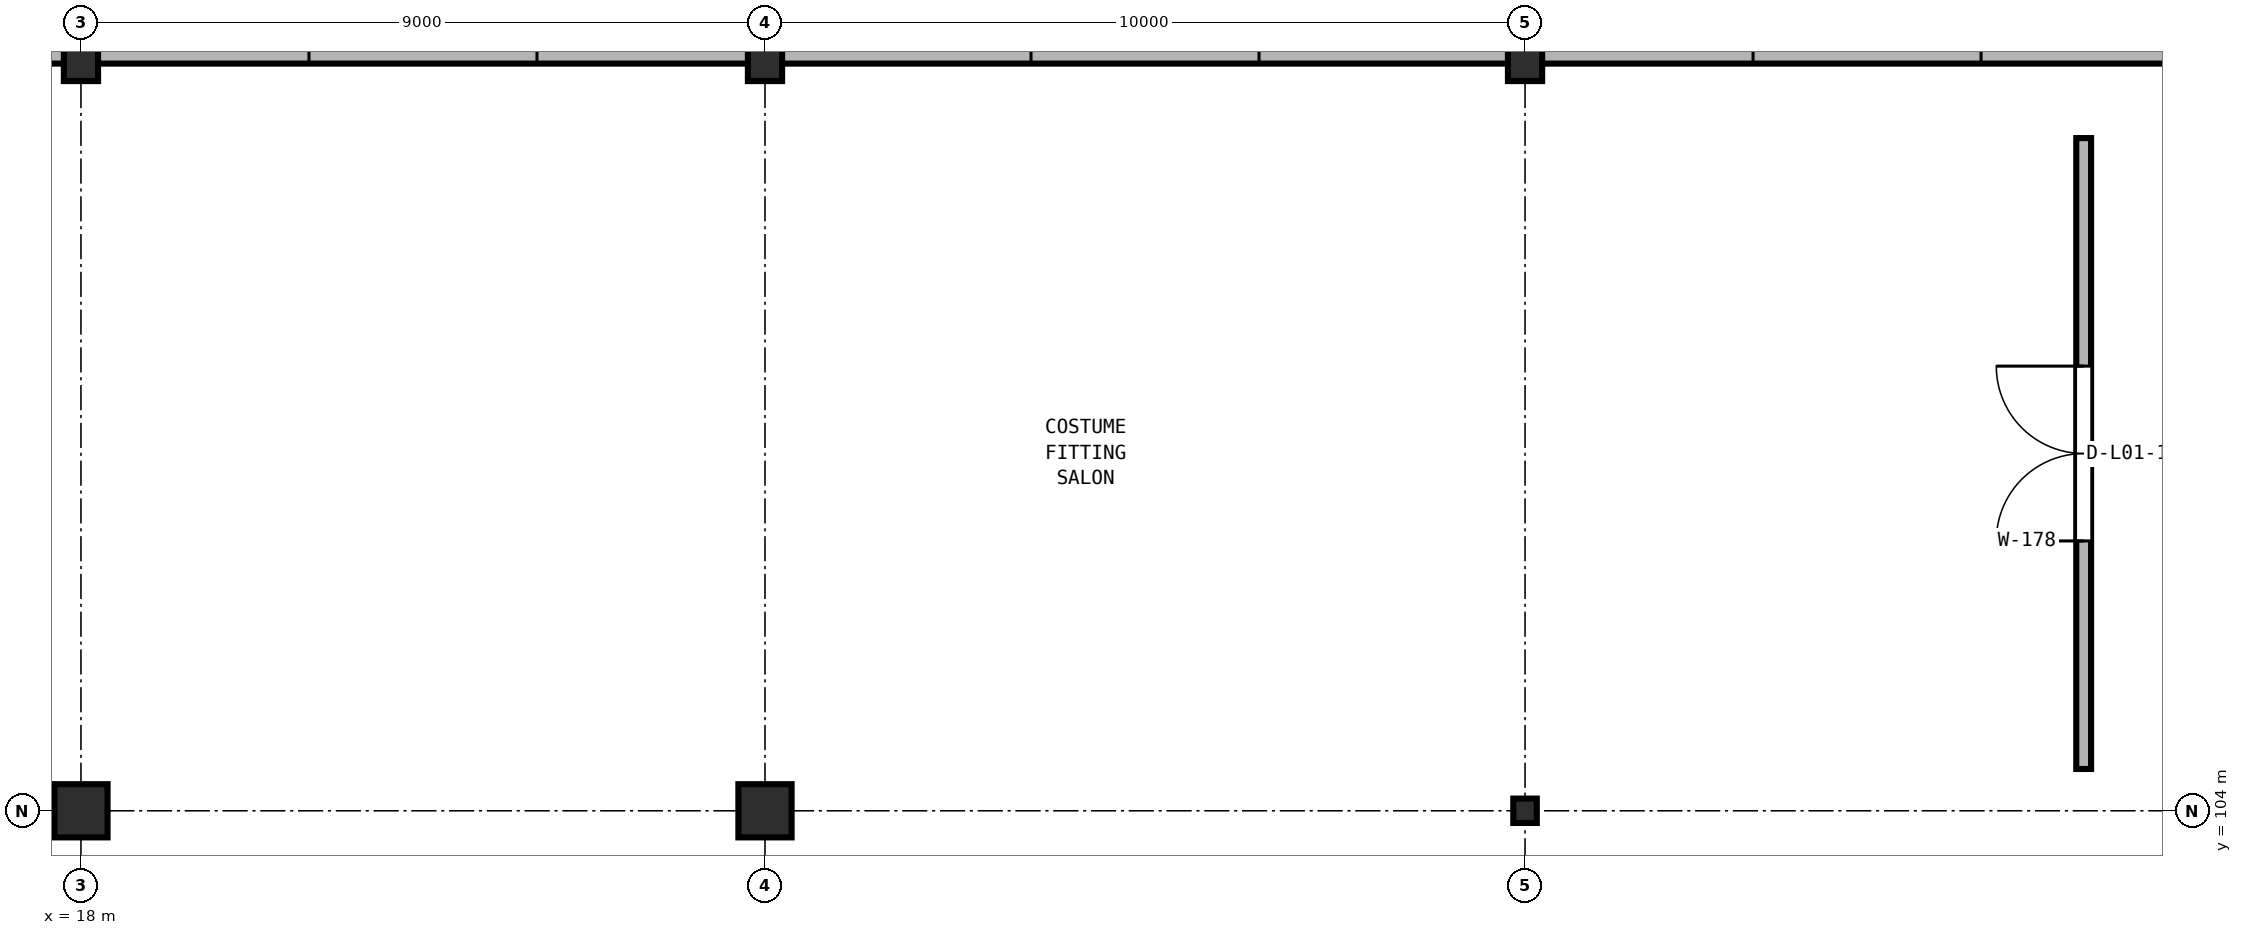
"""IFC4 building model, lengths in metres.
Left out: names, types, materials, properties, quantities, classifications, styles, units other than length and angle.
Written with IfcOpenShell. Run it as: python <this file> out.ifc"""

import sys

from ifc_helpers import new_model, si_unit, direction, frame, frame_2d, origin, origin_2d, place, context, subcontext, project, spatial, rectangle, i_section, extrude, element, fill, save


model = new_model("IFC4")
c1 = context("Model", 3, precision=1e-05, world=origin(), true_north=direction((0.0, 1.0)))
c2 = subcontext(c1, "Body", "Model", "MODEL_VIEW")
j1 = project(units=[si_unit("LENGTHUNIT", "METRE"), si_unit("PLANEANGLEUNIT", "RADIAN")], contexts=[c1])
p1 = place(None, origin())
s1 = spatial("IfcSite", under=j1, at=p1, CompositionType="ELEMENT")
p2 = place(p1, origin())
s2 = spatial("IfcBuilding", under=s1, at=p2, CompositionType="ELEMENT")
p3 = place(p2, frame((0.0, 0.0, 5.4)))
s3 = spatial("IfcBuildingStorey", under=s2, at=p3, CompositionType="ELEMENT", Elevation=5.4)
p4 = place(p3, frame((18.0, 104.0, 0.0), z_axis=(0.0, 0.0, 1.0), x_axis=(1.0, 0.0, 0.0)))
e1 = element("IfcColumn", 1, at=p4, inside=s3, PredefinedType="COLUMN", context=c2, shape_type="SweptSolid", body=[
    extrude(rectangle(XDim=0.7, YDim=0.7, at=origin_2d()), origin(), (0.0, 0.0, 1.0), 4.54),
])
p5 = place(p3, frame((18.0, 114.0, 0.0), z_axis=(0.0, 0.0, 1.0), x_axis=(1.0, 0.0, 0.0)))
e2 = element("IfcColumn", 2, at=p5, inside=s3, PredefinedType="PILASTER", context=c2, shape_type="SweptSolid", body=[
    extrude(rectangle(XDim=0.45, YDim=0.8, at=origin_2d()), origin(), (0.0, 0.0, 1.0), 4.54),
])
p6 = place(p3, frame((27.0, 104.0, 0.0), z_axis=(0.0, 0.0, 1.0), x_axis=(1.0, 0.0, 0.0)))
e3 = element("IfcColumn", 3, at=p6, inside=s3, PredefinedType="COLUMN", context=c2, shape_type="SweptSolid", body=[
    extrude(rectangle(XDim=0.7, YDim=0.7, at=origin_2d()), origin(), (0.0, 0.0, 1.0), 4.54),
])
p7 = place(p3, frame((27.0, 114.0, 0.0), z_axis=(0.0, 0.0, 1.0), x_axis=(1.0, 0.0, 0.0)))
e4 = element("IfcColumn", 4, at=p7, inside=s3, PredefinedType="PILASTER", context=c2, shape_type="SweptSolid", body=[
    extrude(rectangle(XDim=0.45, YDim=0.8, at=origin_2d()), origin(), (0.0, 0.0, 1.0), 4.54),
])
p8 = place(p3, frame((37.0, 104.0, 0.0), z_axis=(0.0, 0.0, 1.0), x_axis=(1.0, 0.0, 0.0)))
e5 = element("IfcColumn", 5, at=p8, inside=s3, PredefinedType="COLUMN", context=c2, shape_type="SweptSolid", body=[
    extrude(i_section(OverallWidth=0.309, OverallDepth=0.321, WebThickness=0.014, FlangeThickness=0.022, FilletRadius=0.017, at=origin_2d()), origin(), (0.0, 0.0, 1.0), 4.54),
])
p9 = place(p3, frame((37.0, 114.0, 0.0), z_axis=(0.0, 0.0, 1.0), x_axis=(1.0, 0.0, 0.0)))
e6 = element("IfcColumn", 6, at=p9, inside=s3, PredefinedType="PILASTER", context=c2, shape_type="SweptSolid", body=[
    extrude(rectangle(XDim=0.45, YDim=0.8, at=origin_2d()), origin(), (0.0, 0.0, 1.0), 4.54),
])
p10 = place(p3, frame((9.221, 114.0, 0.0), z_axis=(0.0, 0.0, 1.0), x_axis=(1.0, 0.0, 0.0)))
e7 = element("IfcWall", 7, at=p10, inside=s3, PredefinedType="SOLIDWALL", context=c2, shape_type="SweptSolid", body=[
    extrude(rectangle(XDim=8.558, YDim=0.34, at=frame_2d((4.279, 0.0))), origin(), (0.0, 0.0, 1.0), 4.191),
])
p11 = place(p10, frame((2.779, 0.0, 2.0)))
e8 = element("IfcOpeningElement", 8, at=p11, cuts=e7, PredefinedType="OPENING", context=c2, shape_type="SweptSolid", body=[
    extrude(rectangle(XDim=3.0, YDim=1.4, at=frame_2d((1.5, 0.7))), frame((0.0, 0.18, 0.0), z_axis=(0.0, -1.0, 0.0), x_axis=(1.0, 0.0, 0.0)), (0.0, 0.0, 1.0), 0.36),
])
p12 = place(p3, frame((18.221, 114.0, 0.0), z_axis=(0.0, 0.0, 1.0), x_axis=(1.0, 0.0, 0.0)))
e9 = element("IfcWall", 9, at=p12, inside=s3, PredefinedType="SOLIDWALL", context=c2, shape_type="SweptSolid", body=[
    extrude(rectangle(XDim=8.558, YDim=0.34, at=frame_2d((4.279, 0.0))), origin(), (0.0, 0.0, 1.0), 4.191),
])
p13 = place(p12, frame((2.779, 0.0, 2.0)))
e10 = element("IfcOpeningElement", 10, at=p13, cuts=e9, PredefinedType="OPENING", context=c2, shape_type="SweptSolid", body=[
    extrude(rectangle(XDim=3.0, YDim=1.4, at=frame_2d((1.5, 0.7))), frame((0.0, 0.18, 0.0), z_axis=(0.0, -1.0, 0.0), x_axis=(1.0, 0.0, 0.0)), (0.0, 0.0, 1.0), 0.36),
])
p14 = place(p3, frame((27.221, 114.0, 0.0), z_axis=(0.0, 0.0, 1.0), x_axis=(1.0, 0.0, 0.0)))
e11 = element("IfcWall", 11, at=p14, inside=s3, PredefinedType="SOLIDWALL", context=c2, shape_type="SweptSolid", body=[
    extrude(rectangle(XDim=9.558, YDim=0.34, at=frame_2d((4.779, 0.0))), origin(), (0.0, 0.0, 1.0), 4.09),
])
p15 = place(p14, frame((3.279, 0.0, 2.0)))
e12 = element("IfcOpeningElement", 12, at=p15, cuts=e11, PredefinedType="OPENING", context=c2, shape_type="SweptSolid", body=[
    extrude(rectangle(XDim=3.0, YDim=1.4, at=frame_2d((1.5, 0.7))), frame((0.0, 0.18, 0.0), z_axis=(0.0, -1.0, 0.0), x_axis=(1.0, 0.0, 0.0)), (0.0, 0.0, 1.0), 0.36),
])
p16 = place(p3, frame((37.221, 114.0, 0.0), z_axis=(0.0, 0.0, 1.0), x_axis=(1.0, 0.0, 0.0)))
e13 = element("IfcWall", 13, at=p16, inside=s3, PredefinedType="SOLIDWALL", context=c2, shape_type="SweptSolid", body=[
    extrude(rectangle(XDim=8.558, YDim=0.34, at=frame_2d((4.279, 0.0))), origin(), (0.0, 0.0, 1.0), 4.191),
])
p17 = place(p16, frame((2.779, 0.0, 2.0)))
e14 = element("IfcOpeningElement", 14, at=p17, cuts=e13, PredefinedType="OPENING", context=c2, shape_type="SweptSolid", body=[
    extrude(rectangle(XDim=3.0, YDim=1.4, at=frame_2d((1.5, 0.7))), frame((0.0, 0.18, 0.0), z_axis=(0.0, -1.0, 0.0), x_axis=(1.0, 0.0, 0.0)), (0.0, 0.0, 1.0), 0.36),
])
p18 = place(p3, frame((44.35, 104.55, 0.0), z_axis=(0.0, 0.0, 1.0), x_axis=(0.0, 1.0, 0.0)))
e15 = element("IfcWall", 15, at=p18, inside=s3, PredefinedType="PARTITIONING", context=c2, shape_type="SweptSolid", body=[
    extrude(rectangle(XDim=8.3, YDim=0.195, at=frame_2d((4.15, 0.0))), origin(), (0.0, 0.0, 1.0), 4.49),
])
p19 = place(p18, frame((3.0, 0.0, 0.0)))
e16 = element("IfcOpeningElement", 16, at=p19, cuts=e15, PredefinedType="OPENING", context=c2, shape_type="SweptSolid", body=[
    extrude(rectangle(XDim=2.3, YDim=2.52, at=frame_2d((1.15, 1.26))), frame((0.0, 0.107, 0.0), z_axis=(0.0, -1.0, 0.0), x_axis=(1.0, 0.0, 0.0)), (0.0, 0.0, 1.0), 0.215),
])
p20 = place(p13, origin())
e17 = element("IfcWindow", 17, at=p20, inside=s3, PartitioningType="SINGLE_PANEL", PredefinedType="WINDOW", context=c2, shape_type="SweptSolid", body=[
    extrude(rectangle(XDim=3.0, YDim=1.4, at=frame_2d((1.5, 0.7))), frame((0.0, 0.03, 0.0), z_axis=(0.0, -1.0, 0.0), x_axis=(1.0, 0.0, 0.0)), (0.0, 0.0, 1.0), 0.06),
])
fill(e10, e17)
p21 = place(p15, origin())
e18 = element("IfcWindow", 18, at=p21, inside=s3, PartitioningType="SINGLE_PANEL", PredefinedType="WINDOW", context=c2, shape_type="SweptSolid", body=[
    extrude(rectangle(XDim=3.0, YDim=1.4, at=frame_2d((1.5, 0.7))), frame((0.0, 0.03, 0.0), z_axis=(0.0, -1.0, 0.0), x_axis=(1.0, 0.0, 0.0)), (0.0, 0.0, 1.0), 0.06),
])
fill(e12, e18)
p22 = place(p17, origin())
e19 = element("IfcWindow", 19, at=p22, inside=s3, PartitioningType="SINGLE_PANEL", PredefinedType="WINDOW", context=c2, shape_type="SweptSolid", body=[
    extrude(rectangle(XDim=3.0, YDim=1.4, at=frame_2d((1.5, 0.7))), frame((0.0, 0.03, 0.0), z_axis=(0.0, -1.0, 0.0), x_axis=(1.0, 0.0, 0.0)), (0.0, 0.0, 1.0), 0.06),
])
fill(e14, e19)
p23 = place(p19, origin())
e20 = element("IfcDoor", 20, at=p23, inside=s3, OperationType="DOUBLE_DOOR_SINGLE_SWING", PredefinedType="DOOR", context=c2, shape_type="SweptSolid", body=[
    extrude(rectangle(XDim=2.3, YDim=2.52, at=frame_2d((1.15, 1.26))), frame((0.0, 0.025, 0.0), z_axis=(0.0, -1.0, 0.0), x_axis=(1.0, 0.0, 0.0)), (0.0, 0.0, 1.0), 0.05),
])
fill(e16, e20)
save(model, sys.argv[1])
